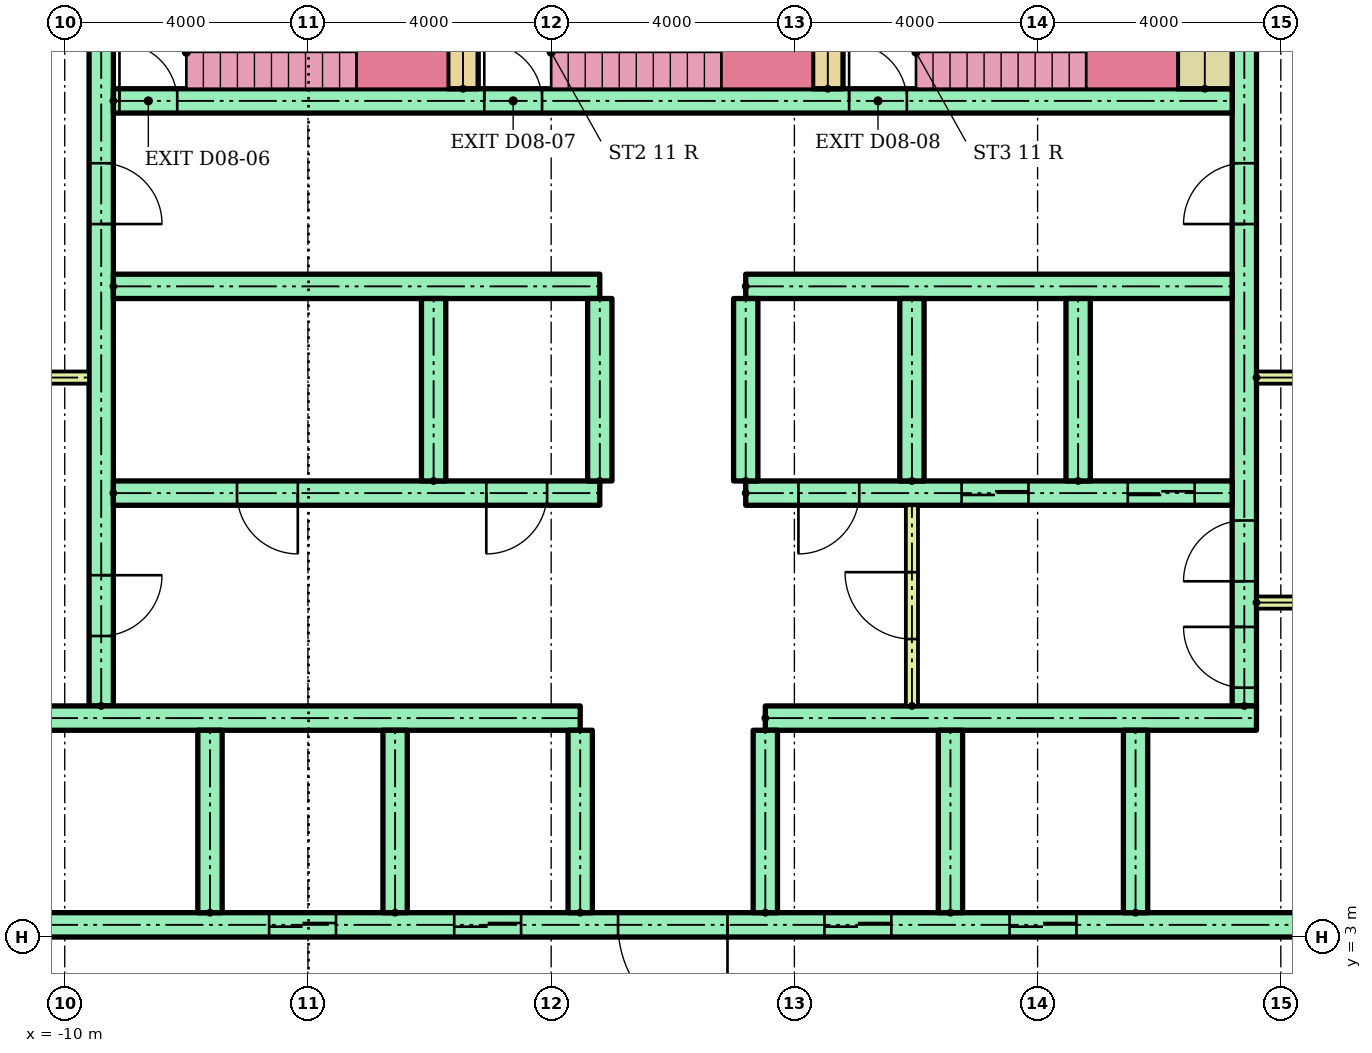
"""IFC4 building model, lengths in metres.
Left out: names, types, materials, properties, quantities, classifications, styles, units other than length and angle.
Written with IfcOpenShell. Run it as: python <this file> out.ifc"""

import sys

from ifc_helpers import new_model, si_unit, direction, frame, frame_2d, origin, place, context, subcontext, project, spatial, rectangle, extrude, element, fill, save


model = new_model("IFC4")
c1 = context("Model", 3, precision=1e-05, world=origin(), true_north=direction((0.0, 1.0)))
c2 = subcontext(c1, "Body", "Model", "MODEL_VIEW")
j1 = project(units=[si_unit("LENGTHUNIT", "METRE"), si_unit("PLANEANGLEUNIT", "RADIAN")], contexts=[c1])
p1 = place(None, origin())
s1 = spatial("IfcSite", under=j1, at=p1, CompositionType="ELEMENT")
p2 = place(p1, origin())
s2 = spatial("IfcBuilding", under=s1, at=p2, CompositionType="ELEMENT")
p3 = place(p2, frame((0.0, 0.0, 33.8)))
s3 = spatial("IfcBuildingStorey", under=s2, at=p3, CompositionType="ELEMENT", Elevation=33.8)
p4 = place(p3, frame((-9.4, 6.8, 0.0), z_axis=(0.0, 0.0, 1.0), x_axis=(0.0, 1.0, 0.0)))
e1 = element("IfcWall", 1, at=p4, inside=s3, PredefinedType="SHEAR", context=c2, shape_type="SweptSolid", body=[
    extrude(rectangle(XDim=12.7, YDim=0.4, at=frame_2d((6.35, 0.0))), origin(), (0.0, 0.0, 1.0), 3.6),
])
p5 = place(p4, frame((1.15, 0.0, 0.0)))
e2 = element("IfcOpeningElement", 2, at=p5, cuts=e1, PredefinedType="OPENING", context=c2, shape_type="SweptSolid", body=[
    extrude(rectangle(XDim=1.0, YDim=2.1, at=frame_2d((0.5, 1.05))), frame((0.0, 0.21, 0.0), z_axis=(0.0, -1.0, 0.0), x_axis=(1.0, 0.0, 0.0)), (0.0, 0.0, 1.0), 0.42),
])
p6 = place(p4, frame((7.925, 0.0, 0.0)))
e3 = element("IfcOpeningElement", 3, at=p6, cuts=e1, PredefinedType="OPENING", context=c2, shape_type="SweptSolid", body=[
    extrude(rectangle(XDim=1.0, YDim=2.1, at=frame_2d((0.5, 1.05))), frame((0.0, 0.21, 0.0), z_axis=(0.0, -1.0, 0.0), x_axis=(1.0, 0.0, 0.0)), (0.0, 0.0, 1.0), 0.42),
])
p7 = place(p3, frame((9.4, 6.8, 0.0), z_axis=(0.0, 0.0, 1.0), x_axis=(0.0, 1.0, 0.0)))
e4 = element("IfcWall", 4, at=p7, inside=s3, PredefinedType="SHEAR", context=c2, shape_type="SweptSolid", body=[
    extrude(rectangle(XDim=12.7, YDim=0.4, at=frame_2d((6.35, 0.0))), origin(), (0.0, 0.0, 1.0), 3.6),
])
p8 = place(p7, frame((0.3, 0.0, 0.0)))
e5 = element("IfcOpeningElement", 5, at=p8, cuts=e4, PredefinedType="OPENING", context=c2, shape_type="SweptSolid", body=[
    extrude(rectangle(XDim=1.0, YDim=2.1, at=frame_2d((0.5, 1.05))), frame((0.0, 0.21, 0.0), z_axis=(0.0, -1.0, 0.0), x_axis=(1.0, 0.0, 0.0)), (0.0, 0.0, 1.0), 0.42),
])
p9 = place(p7, frame((2.05, 0.0, 0.0)))
e6 = element("IfcOpeningElement", 6, at=p9, cuts=e4, PredefinedType="OPENING", context=c2, shape_type="SweptSolid", body=[
    extrude(rectangle(XDim=1.0, YDim=2.1, at=frame_2d((0.5, 1.05))), frame((0.0, 0.21, 0.0), z_axis=(0.0, -1.0, 0.0), x_axis=(1.0, 0.0, 0.0)), (0.0, 0.0, 1.0), 0.42),
])
p10 = place(p7, frame((7.925, 0.0, 0.0)))
e7 = element("IfcOpeningElement", 7, at=p10, cuts=e4, PredefinedType="OPENING", context=c2, shape_type="SweptSolid", body=[
    extrude(rectangle(XDim=1.0, YDim=2.1, at=frame_2d((0.5, 1.05))), frame((0.0, 0.21, 0.0), z_axis=(0.0, -1.0, 0.0), x_axis=(1.0, 0.0, 0.0)), (0.0, 0.0, 1.0), 0.42),
])
p11 = place(p3, frame((-13.5, 3.2, 0.0)))
e8 = element("IfcWall", 8, at=p11, inside=s3, PredefinedType="SHEAR", context=c2, shape_type="SweptSolid", body=[
    extrude(rectangle(XDim=27.0, YDim=0.4, at=frame_2d((13.5, 0.0))), origin(), (0.0, 0.0, 1.0), 3.6),
])
p12 = place(p11, frame((6.861, 0.0, 0.0)))
e9 = element("IfcOpeningElement", 9, at=p12, cuts=e8, PredefinedType="OPENING", context=c2, shape_type="SweptSolid", body=[
    extrude(rectangle(XDim=1.1, YDim=2.1, at=frame_2d((0.55, 1.05))), frame((0.0, 0.21, 0.0), z_axis=(0.0, -1.0, 0.0), x_axis=(1.0, 0.0, 0.0)), (0.0, 0.0, 1.0), 0.42),
])
p13 = place(p11, frame((9.906, 0.0, 0.0)))
e10 = element("IfcOpeningElement", 10, at=p13, cuts=e8, PredefinedType="OPENING", context=c2, shape_type="SweptSolid", body=[
    extrude(rectangle(XDim=1.1, YDim=2.1, at=frame_2d((0.55, 1.05))), frame((0.0, 0.21, 0.0), z_axis=(0.0, -1.0, 0.0), x_axis=(1.0, 0.0, 0.0)), (0.0, 0.0, 1.0), 0.42),
])
p14 = place(p11, frame((15.994, 0.0, 0.0)))
e11 = element("IfcOpeningElement", 11, at=p14, cuts=e8, PredefinedType="OPENING", context=c2, shape_type="SweptSolid", body=[
    extrude(rectangle(XDim=1.1, YDim=2.1, at=frame_2d((0.55, 1.05))), frame((0.0, 0.21, 0.0), z_axis=(0.0, -1.0, 0.0), x_axis=(1.0, 0.0, 0.0)), (0.0, 0.0, 1.0), 0.42),
])
p15 = place(p11, frame((19.039, 0.0, 0.0)))
e12 = element("IfcOpeningElement", 12, at=p15, cuts=e8, PredefinedType="OPENING", context=c2, shape_type="SweptSolid", body=[
    extrude(rectangle(XDim=1.1, YDim=2.1, at=frame_2d((0.55, 1.05))), frame((0.0, 0.21, 0.0), z_axis=(0.0, -1.0, 0.0), x_axis=(1.0, 0.0, 0.0)), (0.0, 0.0, 1.0), 0.42),
])
p16 = place(p11, frame((12.6, 0.0, 0.0)))
e13 = element("IfcOpeningElement", 13, at=p16, cuts=e8, PredefinedType="OPENING", context=c2, shape_type="SweptSolid", body=[
    extrude(rectangle(XDim=1.8, YDim=2.1, at=frame_2d((0.9, 1.05))), frame((0.0, 0.21, 0.0), z_axis=(0.0, -1.0, 0.0), x_axis=(1.0, 0.0, 0.0)), (0.0, 0.0, 1.0), 0.42),
])
p17 = place(p3, frame((-13.5, 6.6, 0.0)))
e14 = element("IfcWall", 14, at=p17, inside=s3, PredefinedType="SHEAR", context=c2, shape_type="SweptSolid", body=[
    extrude(rectangle(XDim=11.978, YDim=0.4, at=frame_2d((5.989, 0.0))), origin(), (0.0, 0.0, 1.0), 3.6),
])
p18 = place(p3, frame((1.522, 6.6, 0.0)))
e15 = element("IfcWall", 15, at=p18, inside=s3, PredefinedType="SHEAR", context=c2, shape_type="SweptSolid", body=[
    extrude(rectangle(XDim=8.078, YDim=0.4, at=frame_2d((4.039, 0.0))), origin(), (0.0, 0.0, 1.0), 3.6),
])
for number, where, z_axis, x_axis in (
    (16, (-7.611, 3.4, 0.0), (0.0, 0.0, 1.0), (0.0, 1.0, 0.0)),
    (17, (-4.567, 3.4, 0.0), (0.0, 0.0, 1.0), (0.0, 1.0, 0.0)),
    (18, (-1.522, 3.4, 0.0), (0.0, 0.0, 1.0), (0.0, 1.0, 0.0)),
    (19, (1.522, 3.4, 0.0), (0.0, 0.0, 1.0), (0.0, 1.0, 0.0)),
    (20, (4.567, 3.4, 0.0), (0.0, 0.0, 1.0), (0.0, 1.0, 0.0)),
    (21, (7.611, 3.4, 0.0), (0.0, 0.0, 1.0), (0.0, 1.0, 0.0)),
):
    element("IfcWall", number, at=place(p3, frame(where, z_axis=z_axis, x_axis=x_axis)), inside=s3, PredefinedType="SHEAR", context=c2, shape_type="SweptSolid", body=[
        extrude(rectangle(XDim=3.0, YDim=0.4, at=frame_2d((1.5, 0.0))), origin(), (0.0, 0.0, 1.0), 3.6),
    ])
p19 = place(p3, frame((-9.2, 10.3, 0.0)))
e22 = element("IfcWall", 22, at=p19, inside=s3, PredefinedType="SHEAR", context=c2, shape_type="SweptSolid", body=[
    extrude(rectangle(XDim=8.0, YDim=0.4, at=frame_2d((4.0, 0.0))), origin(), (0.0, 0.0, 1.0), 3.6),
])
p20 = place(p19, frame((2.033, 0.0, 0.0)))
e23 = element("IfcOpeningElement", 23, at=p20, cuts=e22, PredefinedType="OPENING", context=c2, shape_type="SweptSolid", body=[
    extrude(rectangle(XDim=1.0, YDim=2.1, at=frame_2d((0.5, 1.05))), frame((0.0, 0.21, 0.0), z_axis=(0.0, -1.0, 0.0), x_axis=(1.0, 0.0, 0.0)), (0.0, 0.0, 1.0), 0.42),
])
p21 = place(p19, frame((6.133, 0.0, 0.0)))
e24 = element("IfcOpeningElement", 24, at=p21, cuts=e22, PredefinedType="OPENING", context=c2, shape_type="SweptSolid", body=[
    extrude(rectangle(XDim=1.0, YDim=2.1, at=frame_2d((0.5, 1.05))), frame((0.0, 0.21, 0.0), z_axis=(0.0, -1.0, 0.0), x_axis=(1.0, 0.0, 0.0)), (0.0, 0.0, 1.0), 0.42),
])
p22 = place(p3, frame((-9.2, 13.7, 0.0)))
e25 = element("IfcWall", 25, at=p22, inside=s3, PredefinedType="SHEAR", context=c2, shape_type="SweptSolid", body=[
    extrude(rectangle(XDim=8.0, YDim=0.4, at=frame_2d((4.0, 0.0))), origin(), (0.0, 0.0, 1.0), 3.6),
])
p23 = place(p3, frame((1.2, 10.3, 0.0)))
e26 = element("IfcWall", 26, at=p23, inside=s3, PredefinedType="SHEAR", context=c2, shape_type="SweptSolid", body=[
    extrude(rectangle(XDim=8.0, YDim=0.4, at=frame_2d((4.0, 0.0))), origin(), (0.0, 0.0, 1.0), 3.6),
])
p24 = place(p23, frame((3.55, 0.0, 0.0)))
e27 = element("IfcOpeningElement", 27, at=p24, cuts=e26, PredefinedType="OPENING", context=c2, shape_type="SweptSolid", body=[
    extrude(rectangle(XDim=1.1, YDim=2.1, at=frame_2d((0.55, 1.05))), frame((0.0, 0.21, 0.0), z_axis=(0.0, -1.0, 0.0), x_axis=(1.0, 0.0, 0.0)), (0.0, 0.0, 1.0), 0.42),
])
p25 = place(p23, frame((6.283, 0.0, 0.0)))
e28 = element("IfcOpeningElement", 28, at=p25, cuts=e26, PredefinedType="OPENING", context=c2, shape_type="SweptSolid", body=[
    extrude(rectangle(XDim=1.1, YDim=2.1, at=frame_2d((0.55, 1.05))), frame((0.0, 0.21, 0.0), z_axis=(0.0, -1.0, 0.0), x_axis=(1.0, 0.0, 0.0)), (0.0, 0.0, 1.0), 0.42),
])
p26 = place(p23, frame((0.867, 0.0, 0.0)))
e29 = element("IfcOpeningElement", 29, at=p26, cuts=e26, PredefinedType="OPENING", context=c2, shape_type="SweptSolid", body=[
    extrude(rectangle(XDim=1.0, YDim=2.1, at=frame_2d((0.5, 1.05))), frame((0.0, 0.21, 0.0), z_axis=(0.0, -1.0, 0.0), x_axis=(1.0, 0.0, 0.0)), (0.0, 0.0, 1.0), 0.42),
])
p27 = place(p3, frame((1.2, 13.7, 0.0)))
e30 = element("IfcWall", 30, at=p27, inside=s3, PredefinedType="SHEAR", context=c2, shape_type="SweptSolid", body=[
    extrude(rectangle(XDim=8.0, YDim=0.4, at=frame_2d((4.0, 0.0))), origin(), (0.0, 0.0, 1.0), 3.6),
])
for number, where, z_axis, x_axis in (
    (31, (-3.933, 10.5, 0.0), (0.0, 0.0, 1.0), (0.0, 1.0, 0.0)),
    (32, (-1.2, 10.5, 0.0), (0.0, 0.0, 1.0), (0.0, 1.0, 0.0)),
    (33, (1.2, 10.5, 0.0), (0.0, 0.0, 1.0), (0.0, 1.0, 0.0)),
    (34, (3.933, 10.5, 0.0), (0.0, 0.0, 1.0), (0.0, 1.0, 0.0)),
    (35, (6.667, 10.5, 0.0), (0.0, 0.0, 1.0), (0.0, 1.0, 0.0)),
):
    element("IfcWall", number, at=place(p3, frame(where, z_axis=z_axis, x_axis=x_axis)), inside=s3, PredefinedType="SHEAR", context=c2, shape_type="SweptSolid", body=[
        extrude(rectangle(XDim=3.0, YDim=0.4, at=frame_2d((1.5, 0.0))), origin(), (0.0, 0.0, 1.0), 3.6),
    ])
p28 = place(p3, frame((3.933, 6.8, 0.0), z_axis=(0.0, 0.0, 1.0), x_axis=(0.0, 1.0, 0.0)))
e36 = element("IfcWall", 36, at=p28, inside=s3, PredefinedType="PARTITIONING", context=c2, shape_type="SweptSolid", body=[
    extrude(rectangle(XDim=3.3, YDim=0.2, at=frame_2d((1.65, 0.0))), origin(), (0.0, 0.0, 1.0), 3.6),
])
p29 = place(p28, frame((1.1, 0.0, 0.0)))
e37 = element("IfcOpeningElement", 37, at=p29, cuts=e36, PredefinedType="OPENING", context=c2, shape_type="SweptSolid", body=[
    extrude(rectangle(XDim=1.1, YDim=2.1, at=frame_2d((0.55, 1.05))), frame((0.0, 0.11, 0.0), z_axis=(0.0, -1.0, 0.0), x_axis=(1.0, 0.0, 0.0)), (0.0, 0.0, 1.0), 0.22),
])
p30 = place(p3, frame((-9.2, 16.75, 0.0)))
e38 = element("IfcWall", 38, at=p30, inside=s3, PredefinedType="SHEAR", context=c2, shape_type="SweptSolid", body=[
    extrude(rectangle(XDim=18.4, YDim=0.4, at=frame_2d((9.2, 0.0))), origin(), (0.0, 0.0, 1.0), 3.6),
])
p31 = place(p30, frame((0.1, 0.0, 0.0)))
e39 = element("IfcOpeningElement", 39, at=p31, cuts=e38, PredefinedType="OPENING", context=c2, shape_type="SweptSolid", body=[
    extrude(rectangle(XDim=0.95, YDim=2.1, at=frame_2d((0.475, 1.05))), frame((0.0, 0.21, 0.0), z_axis=(0.0, -1.0, 0.0), x_axis=(1.0, 0.0, 0.0)), (0.0, 0.0, 1.0), 0.42),
])
p32 = place(p30, frame((6.1, 0.0, 0.0)))
e40 = element("IfcOpeningElement", 40, at=p32, cuts=e38, PredefinedType="OPENING", context=c2, shape_type="SweptSolid", body=[
    extrude(rectangle(XDim=0.95, YDim=2.1, at=frame_2d((0.475, 1.05))), frame((0.0, 0.21, 0.0), z_axis=(0.0, -1.0, 0.0), x_axis=(1.0, 0.0, 0.0)), (0.0, 0.0, 1.0), 0.42),
])
p33 = place(p30, frame((12.1, 0.0, 0.0)))
e41 = element("IfcOpeningElement", 41, at=p33, cuts=e38, PredefinedType="OPENING", context=c2, shape_type="SweptSolid", body=[
    extrude(rectangle(XDim=0.95, YDim=2.1, at=frame_2d((0.475, 1.05))), frame((0.0, 0.21, 0.0), z_axis=(0.0, -1.0, 0.0), x_axis=(1.0, 0.0, 0.0)), (0.0, 0.0, 1.0), 0.42),
])
for number, where, z_axis, x_axis in (
    (42, (-3.45, 16.95, 0.0), (0.0, 0.0, 1.0), (0.0, 1.0, 0.0)),
    (43, (2.55, 16.95, 0.0), (0.0, 0.0, 1.0), (0.0, 1.0, 0.0)),
):
    element("IfcWall", number, at=place(p3, frame(where, z_axis=z_axis, x_axis=x_axis)), inside=s3, PredefinedType="SHEAR", context=c2, shape_type="SweptSolid", body=[
        extrude(rectangle(XDim=2.55, YDim=0.5, at=frame_2d((1.275, 0.0))), origin(), (0.0, 0.0, 1.0), 3.6),
    ])
p34 = place(p3, frame((8.75, 16.95, 0.0), z_axis=(0.0, 0.0, 1.0), x_axis=(0.0, 1.0, 0.0)))
e44 = element("IfcWall", 44, at=p34, inside=s3, PredefinedType="SHEAR", context=c2, shape_type="SweptSolid", body=[
    extrude(rectangle(XDim=2.55, YDim=0.9, at=frame_2d((1.275, 0.0))), origin(), (0.0, 0.0, 1.0), 3.6),
])
for number, where in (
    (45, (-13.5, 12.2, 0.0)),
    (46, (9.6, 8.5, 0.0)),
    (47, (9.6, 12.2, 0.0)),
):
    element("IfcWall", number, at=place(p3, frame(where)), inside=s3, PredefinedType="PARTITIONING", context=c2, shape_type="SweptSolid", body=[
        extrude(rectangle(XDim=3.9, YDim=0.2, at=frame_2d((1.95, 0.0))), origin(), (0.0, 0.0, 1.0), 3.6),
    ])
p35 = place(p12, origin())
e48 = element("IfcDoor", 48, at=p35, inside=s3, OperationType="SLIDING_TO_LEFT", PredefinedType="DOOR", context=c2, shape_type="SweptSolid", body=[
    extrude(rectangle(XDim=1.1, YDim=2.1, at=frame_2d((0.55, 1.05))), frame((0.0, 0.025, 0.0), z_axis=(0.0, -1.0, 0.0), x_axis=(1.0, 0.0, 0.0)), (0.0, 0.0, 1.0), 0.05),
])
fill(e9, e48)
p36 = place(p13, origin())
e49 = element("IfcDoor", 49, at=p36, inside=s3, OperationType="SLIDING_TO_LEFT", PredefinedType="DOOR", context=c2, shape_type="SweptSolid", body=[
    extrude(rectangle(XDim=1.1, YDim=2.1, at=frame_2d((0.55, 1.05))), frame((0.0, 0.025, 0.0), z_axis=(0.0, -1.0, 0.0), x_axis=(1.0, 0.0, 0.0)), (0.0, 0.0, 1.0), 0.05),
])
fill(e10, e49)
p37 = place(p14, origin())
e50 = element("IfcDoor", 50, at=p37, inside=s3, OperationType="SLIDING_TO_LEFT", PredefinedType="DOOR", context=c2, shape_type="SweptSolid", body=[
    extrude(rectangle(XDim=1.1, YDim=2.1, at=frame_2d((0.55, 1.05))), frame((0.0, 0.025, 0.0), z_axis=(0.0, -1.0, 0.0), x_axis=(1.0, 0.0, 0.0)), (0.0, 0.0, 1.0), 0.05),
])
fill(e11, e50)
p38 = place(p15, origin())
e51 = element("IfcDoor", 51, at=p38, inside=s3, OperationType="SLIDING_TO_LEFT", PredefinedType="DOOR", context=c2, shape_type="SweptSolid", body=[
    extrude(rectangle(XDim=1.1, YDim=2.1, at=frame_2d((0.55, 1.05))), frame((0.0, 0.025, 0.0), z_axis=(0.0, -1.0, 0.0), x_axis=(1.0, 0.0, 0.0)), (0.0, 0.0, 1.0), 0.05),
])
fill(e12, e51)
p39 = place(p16, frame((1.8, 0.0, 0.0), z_axis=(0.0, 0.0, 1.0), x_axis=(-1.0, 0.0, 0.0)))
e52 = element("IfcDoor", 52, at=p39, inside=s3, OperationType="DOUBLE_DOOR_SINGLE_SWING", PredefinedType="DOOR", context=c2, shape_type="SweptSolid", body=[
    extrude(rectangle(XDim=1.8, YDim=2.1, at=frame_2d((0.9, 1.05))), frame((0.0, 0.025, 0.0), z_axis=(0.0, -1.0, 0.0), x_axis=(1.0, 0.0, 0.0)), (0.0, 0.0, 1.0), 0.05),
])
fill(e13, e52)
p40 = place(p24, origin())
e53 = element("IfcDoor", 53, at=p40, inside=s3, OperationType="SLIDING_TO_LEFT", PredefinedType="DOOR", context=c2, shape_type="SweptSolid", body=[
    extrude(rectangle(XDim=1.1, YDim=2.1, at=frame_2d((0.55, 1.05))), frame((0.0, 0.025, 0.0), z_axis=(0.0, -1.0, 0.0), x_axis=(1.0, 0.0, 0.0)), (0.0, 0.0, 1.0), 0.05),
])
fill(e27, e53)
p41 = place(p25, origin())
e54 = element("IfcDoor", 54, at=p41, inside=s3, OperationType="SLIDING_TO_LEFT", PredefinedType="DOOR", context=c2, shape_type="SweptSolid", body=[
    extrude(rectangle(XDim=1.1, YDim=2.1, at=frame_2d((0.55, 1.05))), frame((0.0, 0.025, 0.0), z_axis=(0.0, -1.0, 0.0), x_axis=(1.0, 0.0, 0.0)), (0.0, 0.0, 1.0), 0.05),
])
fill(e28, e54)
p42 = place(p20, frame((1.0, 0.0, 0.0), z_axis=(0.0, 0.0, 1.0), x_axis=(-1.0, 0.0, 0.0)))
e55 = element("IfcDoor", 55, at=p42, inside=s3, OperationType="SINGLE_SWING_RIGHT", PredefinedType="DOOR", context=c2, shape_type="SweptSolid", body=[
    extrude(rectangle(XDim=1.0, YDim=2.1, at=frame_2d((0.5, 1.05))), frame((0.0, 0.025, 0.0), z_axis=(0.0, -1.0, 0.0), x_axis=(1.0, 0.0, 0.0)), (0.0, 0.0, 1.0), 0.05),
])
fill(e23, e55)
p43 = place(p21, frame((1.0, 0.0, 0.0), z_axis=(0.0, 0.0, 1.0), x_axis=(-1.0, 0.0, 0.0)))
e56 = element("IfcDoor", 56, at=p43, inside=s3, OperationType="SINGLE_SWING_LEFT", PredefinedType="DOOR", context=c2, shape_type="SweptSolid", body=[
    extrude(rectangle(XDim=1.0, YDim=2.1, at=frame_2d((0.5, 1.05))), frame((0.0, 0.025, 0.0), z_axis=(0.0, -1.0, 0.0), x_axis=(1.0, 0.0, 0.0)), (0.0, 0.0, 1.0), 0.05),
])
fill(e24, e56)
p44 = place(p26, frame((1.0, 0.0, 0.0), z_axis=(0.0, 0.0, 1.0), x_axis=(-1.0, 0.0, 0.0)))
e57 = element("IfcDoor", 57, at=p44, inside=s3, OperationType="SINGLE_SWING_LEFT", PredefinedType="DOOR", context=c2, shape_type="SweptSolid", body=[
    extrude(rectangle(XDim=1.0, YDim=2.1, at=frame_2d((0.5, 1.05))), frame((0.0, 0.025, 0.0), z_axis=(0.0, -1.0, 0.0), x_axis=(1.0, 0.0, 0.0)), (0.0, 0.0, 1.0), 0.05),
])
fill(e29, e57)
p45 = place(p29, origin())
e58 = element("IfcDoor", 58, at=p45, inside=s3, OperationType="SINGLE_SWING_RIGHT", PredefinedType="DOOR", context=c2, shape_type="SweptSolid", body=[
    extrude(rectangle(XDim=1.1, YDim=2.1, at=frame_2d((0.55, 1.05))), frame((0.0, 0.025, 0.0), z_axis=(0.0, -1.0, 0.0), x_axis=(1.0, 0.0, 0.0)), (0.0, 0.0, 1.0), 0.05),
])
fill(e37, e58)
p46 = place(p31, origin())
e59 = element("IfcDoor", 59, at=p46, inside=s3, OperationType="SINGLE_SWING_LEFT", PredefinedType="DOOR", context=c2, shape_type="SweptSolid", body=[
    extrude(rectangle(XDim=0.95, YDim=2.1, at=frame_2d((0.475, 1.05))), frame((0.0, 0.025, 0.0), z_axis=(0.0, -1.0, 0.0), x_axis=(1.0, 0.0, 0.0)), (0.0, 0.0, 1.0), 0.05),
])
fill(e39, e59)
p47 = place(p32, origin())
e60 = element("IfcDoor", 60, at=p47, inside=s3, OperationType="SINGLE_SWING_LEFT", PredefinedType="DOOR", context=c2, shape_type="SweptSolid", body=[
    extrude(rectangle(XDim=0.95, YDim=2.1, at=frame_2d((0.475, 1.05))), frame((0.0, 0.025, 0.0), z_axis=(0.0, -1.0, 0.0), x_axis=(1.0, 0.0, 0.0)), (0.0, 0.0, 1.0), 0.05),
])
fill(e40, e60)
p48 = place(p33, origin())
e61 = element("IfcDoor", 61, at=p48, inside=s3, OperationType="SINGLE_SWING_LEFT", PredefinedType="DOOR", context=c2, shape_type="SweptSolid", body=[
    extrude(rectangle(XDim=0.95, YDim=2.1, at=frame_2d((0.475, 1.05))), frame((0.0, 0.025, 0.0), z_axis=(0.0, -1.0, 0.0), x_axis=(1.0, 0.0, 0.0)), (0.0, 0.0, 1.0), 0.05),
])
fill(e41, e61)
p49 = place(p5, frame((1.0, 0.0, 0.0), z_axis=(0.0, 0.0, 1.0), x_axis=(-1.0, 0.0, 0.0)))
e62 = element("IfcDoor", 62, at=p49, inside=s3, OperationType="SINGLE_SWING_RIGHT", PredefinedType="DOOR", context=c2, shape_type="SweptSolid", body=[
    extrude(rectangle(XDim=1.0, YDim=2.1, at=frame_2d((0.5, 1.05))), frame((0.0, 0.025, 0.0), z_axis=(0.0, -1.0, 0.0), x_axis=(1.0, 0.0, 0.0)), (0.0, 0.0, 1.0), 0.05),
])
fill(e2, e62)
p50 = place(p6, frame((1.0, 0.0, 0.0), z_axis=(0.0, 0.0, 1.0), x_axis=(-1.0, 0.0, 0.0)))
e63 = element("IfcDoor", 63, at=p50, inside=s3, OperationType="SINGLE_SWING_LEFT", PredefinedType="DOOR", context=c2, shape_type="SweptSolid", body=[
    extrude(rectangle(XDim=1.0, YDim=2.1, at=frame_2d((0.5, 1.05))), frame((0.0, 0.025, 0.0), z_axis=(0.0, -1.0, 0.0), x_axis=(1.0, 0.0, 0.0)), (0.0, 0.0, 1.0), 0.05),
])
fill(e3, e63)
p51 = place(p8, origin())
e64 = element("IfcDoor", 64, at=p51, inside=s3, OperationType="SINGLE_SWING_RIGHT", PredefinedType="DOOR", context=c2, shape_type="SweptSolid", body=[
    extrude(rectangle(XDim=1.0, YDim=2.1, at=frame_2d((0.5, 1.05))), frame((0.0, 0.025, 0.0), z_axis=(0.0, -1.0, 0.0), x_axis=(1.0, 0.0, 0.0)), (0.0, 0.0, 1.0), 0.05),
])
fill(e5, e64)
p52 = place(p9, origin())
e65 = element("IfcDoor", 65, at=p52, inside=s3, OperationType="SINGLE_SWING_LEFT", PredefinedType="DOOR", context=c2, shape_type="SweptSolid", body=[
    extrude(rectangle(XDim=1.0, YDim=2.1, at=frame_2d((0.5, 1.05))), frame((0.0, 0.025, 0.0), z_axis=(0.0, -1.0, 0.0), x_axis=(1.0, 0.0, 0.0)), (0.0, 0.0, 1.0), 0.05),
])
fill(e6, e65)
p53 = place(p10, origin())
e66 = element("IfcDoor", 66, at=p53, inside=s3, OperationType="SINGLE_SWING_LEFT", PredefinedType="DOOR", context=c2, shape_type="SweptSolid", body=[
    extrude(rectangle(XDim=1.0, YDim=2.1, at=frame_2d((0.5, 1.05))), frame((0.0, 0.025, 0.0), z_axis=(0.0, -1.0, 0.0), x_axis=(1.0, 0.0, 0.0)), (0.0, 0.0, 1.0), 0.05),
])
fill(e7, e66)
save(model, sys.argv[1])
